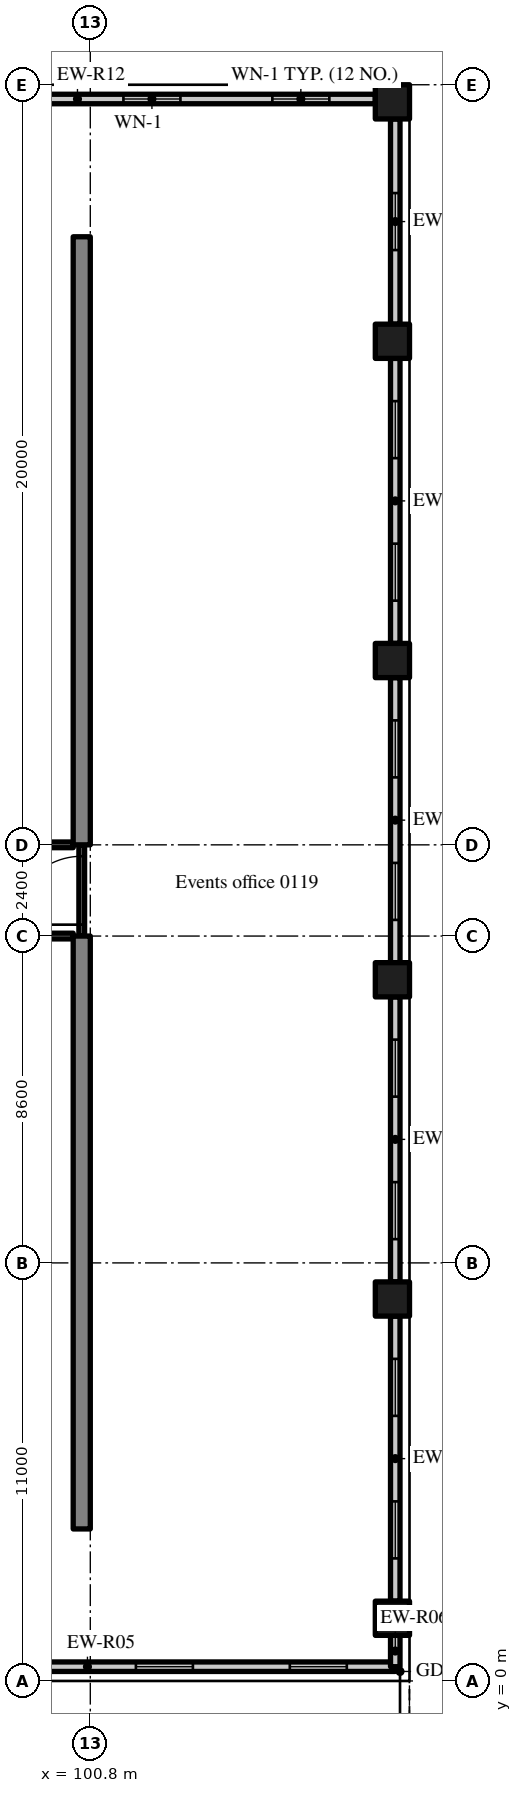
"""IFC4 building model, lengths in metres.
Left out: names, types, materials, properties, quantities, classifications, styles, units other than length and angle.
Written with IfcOpenShell. Run it as: python <this file> out.ifc"""

import sys

from ifc_helpers import new_model, si_unit, direction, frame, frame_2d, origin, origin_2d, place, context, subcontext, project, spatial, rectangle, extrude, source, transform, mapped, element, fill, save


model = new_model("IFC4")
c1 = context("Model", 3, precision=1e-05, world=origin(), true_north=direction((0.0, 1.0)))
c2 = subcontext(c1, "Body", "Model", "MODEL_VIEW")
j1 = project(units=[si_unit("LENGTHUNIT", "METRE"), si_unit("PLANEANGLEUNIT", "RADIAN")], contexts=[c1])
p1 = place(None, origin())
s1 = spatial("IfcSite", under=j1, at=p1, CompositionType="ELEMENT")
p2 = place(p1, origin())
s2 = spatial("IfcBuilding", under=s1, at=p2, CompositionType="ELEMENT")
p3 = place(p2, frame((0.0, 0.0, 6.0)))
s3 = spatial("IfcBuildingStorey", under=s2, at=p3, CompositionType="ELEMENT", Elevation=6.0)
m1 = source(origin(), c2, "Body", "SweptSolid", [
    extrude(rectangle(XDim=15.6, YDim=0.45, at=frame_2d((7.8, 0.0))), origin(), (0.0, 0.0, 1.0), 5.12),
])
p4 = place(p3, frame((100.575, 4.0, 0.0), z_axis=(0.0, 0.0, 1.0), x_axis=(0.0, 1.0, 0.0)))
e1 = element("IfcWall", 1, at=p4, inside=s3, PredefinedType="SHEAR", context=c2, shape_type="MappedRepresentation", body=[
    mapped(m1, transform((0.0, 0.0, 0.0), scale=1.0)),
])
m2 = source(origin(), c2, "Body", "SweptSolid", [
    extrude(rectangle(XDim=16.0, YDim=0.45, at=frame_2d((8.0, 0.0))), origin(), (0.0, 0.0, 1.0), 5.12),
])
p5 = place(p3, frame((100.575, 22.0, 0.0), z_axis=(0.0, 0.0, 1.0), x_axis=(0.0, 1.0, 0.0)))
e2 = element("IfcWall", 2, at=p5, inside=s3, PredefinedType="SHEAR", context=c2, shape_type="MappedRepresentation", body=[
    mapped(m2, transform((0.0, 0.0, 0.0), scale=1.0)),
])
m3 = source(origin(), c2, "Body", "SweptSolid", [
    extrude(rectangle(XDim=0.9, YDim=0.9, at=origin_2d()), origin(), (0.0, 0.0, 1.0), 5.12),
])
for number, where, z_axis, x_axis in (
    (3, (108.75, 1.65, 0.0), (0.0, 0.0, 1.0), (1.0, 0.0, 0.0)),
    (4, (108.75, 10.05, 0.0), (0.0, 0.0, 1.0), (1.0, 0.0, 0.0)),
    (5, (108.75, 18.45, 0.0), (0.0, 0.0, 1.0), (1.0, 0.0, 0.0)),
    (6, (108.75, 26.85, 0.0), (0.0, 0.0, 1.0), (1.0, 0.0, 0.0)),
    (7, (108.75, 35.25, 0.0), (0.0, 0.0, 1.0), (1.0, 0.0, 0.0)),
    (8, (108.75, 41.55, 0.0), (0.0, 0.0, 1.0), (1.0, 0.0, 0.0)),
):
    element("IfcColumn", number, at=place(p3, frame(where, z_axis=z_axis, x_axis=x_axis)), inside=s3, PredefinedType="COLUMN", context=c2, shape_type="MappedRepresentation", body=[
        mapped(m3, transform((0.0, 0.0, 0.0), scale=1.0)),
    ])
m4 = source(origin(), c2, "Body", "SweptSolid", [
    extrude(rectangle(XDim=16.2, YDim=0.25, at=frame_2d((8.1, 0.0))), origin(), (0.0, 0.0, 1.0), 4.37),
])
p6 = place(p3, frame((92.625, 0.375, 0.0), z_axis=(0.0, 0.0, 1.0), x_axis=(1.0, 0.0, 0.0)))
e9 = element("IfcWall", 9, at=p6, inside=s3, PredefinedType="SOLIDWALL", context=c2, shape_type="MappedRepresentation", body=[
    mapped(m4, transform((0.0, 0.0, 0.0), scale=1.0)),
])
m5 = source(origin(), c2, "Body", "SweptSolid", [
    extrude(rectangle(XDim=1.5, YDim=2.0, at=frame_2d((0.75, 1.0))), frame((0.0, 0.135, 0.0), z_axis=(0.0, -1.0, 0.0), x_axis=(1.0, 0.0, 0.0)), (0.0, 0.0, 1.0), 0.27),
])
p7 = place(p6, frame((1.275, 0.0, 0.9)))
e10 = element("IfcOpeningElement", 10, at=p7, cuts=e9, PredefinedType="OPENING", context=c2, shape_type="MappedRepresentation", body=[
    mapped(m5, transform((0.0, 0.0, 0.0), scale=1.0)),
])
p8 = place(p6, frame((5.325, 0.0, 0.9)))
e11 = element("IfcOpeningElement", 11, at=p8, cuts=e9, PredefinedType="OPENING", context=c2, shape_type="MappedRepresentation", body=[
    mapped(m5, transform((0.0, 0.0, 0.0), scale=1.0)),
])
p9 = place(p6, frame((9.375, 0.0, 0.9)))
e12 = element("IfcOpeningElement", 12, at=p9, cuts=e9, PredefinedType="OPENING", context=c2, shape_type="MappedRepresentation", body=[
    mapped(m5, transform((0.0, 0.0, 0.0), scale=1.0)),
])
p10 = place(p6, frame((13.425, 0.0, 0.9)))
e13 = element("IfcOpeningElement", 13, at=p10, cuts=e9, PredefinedType="OPENING", context=c2, shape_type="MappedRepresentation", body=[
    mapped(m5, transform((0.0, 0.0, 0.0), scale=1.0)),
])
m6 = source(origin(), c2, "Body", "SweptSolid", [
    extrude(rectangle(XDim=0.825, YDim=0.25, at=frame_2d((0.413, 0.0))), origin(), (0.0, 0.0, 1.0), 4.12),
])
p11 = place(p3, frame((108.825, 0.375, 0.0), z_axis=(0.0, 0.0, 1.0), x_axis=(0.0, 1.0, 0.0)))
e14 = element("IfcWall", 14, at=p11, inside=s3, PredefinedType="SOLIDWALL", context=c2, shape_type="MappedRepresentation", body=[
    mapped(m6, transform((0.0, 0.0, 0.0), scale=1.0)),
])
m7 = source(origin(), c2, "Body", "SweptSolid", [
    extrude(rectangle(XDim=7.5, YDim=0.25, at=frame_2d((3.75, 0.0))), origin(), (0.0, 0.0, 1.0), 4.12),
])
p12 = place(p3, frame((108.825, 2.1, 0.0), z_axis=(0.0, 0.0, 1.0), x_axis=(0.0, 1.0, 0.0)))
e15 = element("IfcWall", 15, at=p12, inside=s3, PredefinedType="SOLIDWALL", context=c2, shape_type="MappedRepresentation", body=[
    mapped(m7, transform((0.0, 0.0, 0.0), scale=1.0)),
])
p13 = place(p12, frame((1.125, 0.0, 0.9)))
e16 = element("IfcOpeningElement", 16, at=p13, cuts=e15, PredefinedType="OPENING", context=c2, shape_type="MappedRepresentation", body=[
    mapped(m5, transform((0.0, 0.0, 0.0), scale=1.0)),
])
p14 = place(p12, frame((4.875, 0.0, 0.9)))
e17 = element("IfcOpeningElement", 17, at=p14, cuts=e15, PredefinedType="OPENING", context=c2, shape_type="MappedRepresentation", body=[
    mapped(m5, transform((0.0, 0.0, 0.0), scale=1.0)),
])
p15 = place(p3, frame((108.825, 10.5, 0.0), z_axis=(0.0, 0.0, 1.0), x_axis=(0.0, 1.0, 0.0)))
e18 = element("IfcWall", 18, at=p15, inside=s3, PredefinedType="SOLIDWALL", context=c2, shape_type="MappedRepresentation", body=[
    mapped(m7, transform((0.0, 0.0, 0.0), scale=1.0)),
])
p16 = place(p15, frame((1.125, 0.0, 0.9)))
e19 = element("IfcOpeningElement", 19, at=p16, cuts=e18, PredefinedType="OPENING", context=c2, shape_type="MappedRepresentation", body=[
    mapped(m5, transform((0.0, 0.0, 0.0), scale=1.0)),
])
p17 = place(p15, frame((4.875, 0.0, 0.9)))
e20 = element("IfcOpeningElement", 20, at=p17, cuts=e18, PredefinedType="OPENING", context=c2, shape_type="MappedRepresentation", body=[
    mapped(m5, transform((0.0, 0.0, 0.0), scale=1.0)),
])
p18 = place(p3, frame((108.825, 18.9, 0.0), z_axis=(0.0, 0.0, 1.0), x_axis=(0.0, 1.0, 0.0)))
e21 = element("IfcWall", 21, at=p18, inside=s3, PredefinedType="SOLIDWALL", context=c2, shape_type="MappedRepresentation", body=[
    mapped(m7, transform((0.0, 0.0, 0.0), scale=1.0)),
])
p19 = place(p18, frame((1.125, 0.0, 0.9)))
e22 = element("IfcOpeningElement", 22, at=p19, cuts=e21, PredefinedType="OPENING", context=c2, shape_type="MappedRepresentation", body=[
    mapped(m5, transform((0.0, 0.0, 0.0), scale=1.0)),
])
p20 = place(p18, frame((4.875, 0.0, 0.9)))
e23 = element("IfcOpeningElement", 23, at=p20, cuts=e21, PredefinedType="OPENING", context=c2, shape_type="MappedRepresentation", body=[
    mapped(m5, transform((0.0, 0.0, 0.0), scale=1.0)),
])
p21 = place(p3, frame((108.825, 27.3, 0.0), z_axis=(0.0, 0.0, 1.0), x_axis=(0.0, 1.0, 0.0)))
e24 = element("IfcWall", 24, at=p21, inside=s3, PredefinedType="SOLIDWALL", context=c2, shape_type="MappedRepresentation", body=[
    mapped(m7, transform((0.0, 0.0, 0.0), scale=1.0)),
])
p22 = place(p21, frame((1.125, 0.0, 0.9)))
e25 = element("IfcOpeningElement", 25, at=p22, cuts=e24, PredefinedType="OPENING", context=c2, shape_type="MappedRepresentation", body=[
    mapped(m5, transform((0.0, 0.0, 0.0), scale=1.0)),
])
p23 = place(p21, frame((4.875, 0.0, 0.9)))
e26 = element("IfcOpeningElement", 26, at=p23, cuts=e24, PredefinedType="OPENING", context=c2, shape_type="MappedRepresentation", body=[
    mapped(m5, transform((0.0, 0.0, 0.0), scale=1.0)),
])
m8 = source(origin(), c2, "Body", "SweptSolid", [
    extrude(rectangle(XDim=5.4, YDim=0.25, at=frame_2d((2.7, 0.0))), origin(), (0.0, 0.0, 1.0), 4.12),
])
p24 = place(p3, frame((108.825, 35.7, 0.0), z_axis=(0.0, 0.0, 1.0), x_axis=(0.0, 1.0, 0.0)))
e27 = element("IfcWall", 27, at=p24, inside=s3, PredefinedType="SOLIDWALL", context=c2, shape_type="MappedRepresentation", body=[
    mapped(m8, transform((0.0, 0.0, 0.0), scale=1.0)),
])
p25 = place(p24, frame((1.95, 0.0, 0.9)))
e28 = element("IfcOpeningElement", 28, at=p25, cuts=e27, PredefinedType="OPENING", context=c2, shape_type="MappedRepresentation", body=[
    mapped(m5, transform((0.0, 0.0, 0.0), scale=1.0)),
])
m9 = source(origin(), c2, "Body", "SweptSolid", [
    extrude(rectangle(XDim=15.675, YDim=0.25, at=frame_2d((7.837, 0.0))), origin(), (0.0, 0.0, 1.0), 4.37),
])
p26 = place(p3, frame((108.3, 41.625, 0.0), z_axis=(0.0, 0.0, 1.0), x_axis=(-1.0, 0.0, 0.0)))
e29 = element("IfcWall", 29, at=p26, inside=s3, PredefinedType="SOLIDWALL", context=c2, shape_type="MappedRepresentation", body=[
    mapped(m9, transform((0.0, 0.0, 0.0), scale=1.0)),
])
m10 = source(origin(), c2, "Body", "SweptSolid", [
    extrude(rectangle(XDim=1.5, YDim=1.5, at=frame_2d((0.75, 0.75))), frame((0.0, 0.135, 0.0), z_axis=(0.0, -1.0, 0.0), x_axis=(1.0, 0.0, 0.0)), (0.0, 0.0, 1.0), 0.27),
])
p27 = place(p26, frame((1.209, 0.0, 0.9)))
e30 = element("IfcOpeningElement", 30, at=p27, cuts=e29, PredefinedType="OPENING", context=c2, shape_type="MappedRepresentation", body=[
    mapped(m10, transform((0.0, 0.0, 0.0), scale=1.0)),
])
p28 = place(p26, frame((5.128, 0.0, 0.9)))
e31 = element("IfcOpeningElement", 31, at=p28, cuts=e29, PredefinedType="OPENING", context=c2, shape_type="MappedRepresentation", body=[
    mapped(m10, transform((0.0, 0.0, 0.0), scale=1.0)),
])
p29 = place(p26, frame((9.047, 0.0, 0.9)))
e32 = element("IfcOpeningElement", 32, at=p29, cuts=e29, PredefinedType="OPENING", context=c2, shape_type="MappedRepresentation", body=[
    mapped(m10, transform((0.0, 0.0, 0.0), scale=1.0)),
])
p30 = place(p26, frame((12.966, 0.0, 0.9)))
e33 = element("IfcOpeningElement", 33, at=p30, cuts=e29, PredefinedType="OPENING", context=c2, shape_type="MappedRepresentation", body=[
    mapped(m10, transform((0.0, 0.0, 0.0), scale=1.0)),
])
m11 = source(origin(), c2, "Body", "SweptSolid", [
    extrude(rectangle(XDim=3.675, YDim=0.15, at=frame_2d((1.837, 0.0))), origin(), (0.0, 0.0, 1.0), 4.42),
])
p31 = place(p3, frame((96.675, 19.6, 0.0), z_axis=(0.0, 0.0, 1.0), x_axis=(1.0, 0.0, 0.0)))
e34 = element("IfcWall", 34, at=p31, inside=s3, PredefinedType="PARTITIONING", context=c2, shape_type="MappedRepresentation", body=[
    mapped(m11, transform((0.0, 0.0, 0.0), scale=1.0)),
])
m12 = source(origin(), c2, "Body", "SweptSolid", [
    extrude(rectangle(XDim=1.0, YDim=2.1, at=frame_2d((0.5, 1.05))), frame((0.0, 0.085, 0.0), z_axis=(0.0, -1.0, 0.0), x_axis=(1.0, 0.0, 0.0)), (0.0, 0.0, 1.0), 0.17),
])
p32 = place(p31, frame((1.337, 0.0, 0.0)))
e35 = element("IfcOpeningElement", 35, at=p32, cuts=e34, PredefinedType="OPENING", context=c2, shape_type="MappedRepresentation", body=[
    mapped(m12, transform((0.0, 0.0, 0.0), scale=1.0)),
])
m13 = source(origin(), c2, "Body", "SweptSolid", [
    extrude(rectangle(XDim=2.4, YDim=0.15, at=frame_2d((1.2, 0.0))), origin(), (0.0, 0.0, 1.0), 4.22),
])
p33 = place(p3, frame((100.575, 19.6, 0.0), z_axis=(0.0, 0.0, 1.0), x_axis=(0.0, 1.0, 0.0)))
e36 = element("IfcWall", 36, at=p33, inside=s3, PredefinedType="PARTITIONING", context=c2, shape_type="MappedRepresentation", body=[
    mapped(m13, transform((0.0, 0.0, 0.0), scale=1.0)),
])
m14 = source(origin(), c2, "Body", "SweptSolid", [
    extrude(rectangle(XDim=1.8, YDim=2.1, at=frame_2d((0.9, 1.05))), frame((0.0, 0.085, 0.0), z_axis=(0.0, -1.0, 0.0), x_axis=(1.0, 0.0, 0.0)), (0.0, 0.0, 1.0), 0.17),
])
p34 = place(p33, frame((0.3, 0.0, 0.0)))
e37 = element("IfcOpeningElement", 37, at=p34, cuts=e36, PredefinedType="OPENING", context=c2, shape_type="MappedRepresentation", body=[
    mapped(m14, transform((0.0, 0.0, 0.0), scale=1.0)),
])
m15 = source(origin(), c2, "Body", "SweptSolid", [
    extrude(rectangle(XDim=7.725, YDim=0.15, at=frame_2d((3.863, 0.0))), origin(), (0.0, 0.0, 1.0), 4.42),
])
p35 = place(p3, frame((92.625, 22.0, 0.0), z_axis=(0.0, 0.0, 1.0), x_axis=(1.0, 0.0, 0.0)))
e38 = element("IfcWall", 38, at=p35, inside=s3, PredefinedType="PARTITIONING", context=c2, shape_type="MappedRepresentation", body=[
    mapped(m15, transform((0.0, 0.0, 0.0), scale=1.0)),
])
p36 = place(p35, frame((2.962, 0.0, 0.0)))
e39 = element("IfcOpeningElement", 39, at=p36, cuts=e38, PredefinedType="OPENING", context=c2, shape_type="MappedRepresentation", body=[
    mapped(m14, transform((0.0, 0.0, 0.0), scale=1.0)),
])
m16 = source(origin(), c2, "Body", "SweptSolid", [
    extrude(rectangle(XDim=1.5, YDim=2.0, at=frame_2d((0.75, 1.0))), frame((0.0, 0.03, 0.0), z_axis=(0.0, -1.0, 0.0), x_axis=(1.0, 0.0, 0.0)), (0.0, 0.0, 1.0), 0.06),
])
p37 = place(p9, origin())
e40 = element("IfcWindow", 40, at=p37, inside=s3, PartitioningType="SINGLE_PANEL", PredefinedType="WINDOW", context=c2, shape_type="MappedRepresentation", body=[
    mapped(m16, transform((0.0, 0.0, 0.0), scale=1.0)),
])
fill(e12, e40)
p38 = place(p10, origin())
e41 = element("IfcWindow", 41, at=p38, inside=s3, PartitioningType="SINGLE_PANEL", PredefinedType="WINDOW", context=c2, shape_type="MappedRepresentation", body=[
    mapped(m16, transform((0.0, 0.0, 0.0), scale=1.0)),
])
fill(e13, e41)
p39 = place(p13, origin())
e42 = element("IfcWindow", 42, at=p39, inside=s3, PartitioningType="SINGLE_PANEL", PredefinedType="WINDOW", context=c2, shape_type="MappedRepresentation", body=[
    mapped(m16, transform((0.0, 0.0, 0.0), scale=1.0)),
])
fill(e16, e42)
p40 = place(p14, origin())
e43 = element("IfcWindow", 43, at=p40, inside=s3, PartitioningType="SINGLE_PANEL", PredefinedType="WINDOW", context=c2, shape_type="MappedRepresentation", body=[
    mapped(m16, transform((0.0, 0.0, 0.0), scale=1.0)),
])
fill(e17, e43)
p41 = place(p16, origin())
e44 = element("IfcWindow", 44, at=p41, inside=s3, PartitioningType="SINGLE_PANEL", PredefinedType="WINDOW", context=c2, shape_type="MappedRepresentation", body=[
    mapped(m16, transform((0.0, 0.0, 0.0), scale=1.0)),
])
fill(e19, e44)
p42 = place(p17, origin())
e45 = element("IfcWindow", 45, at=p42, inside=s3, PartitioningType="SINGLE_PANEL", PredefinedType="WINDOW", context=c2, shape_type="MappedRepresentation", body=[
    mapped(m16, transform((0.0, 0.0, 0.0), scale=1.0)),
])
fill(e20, e45)
p43 = place(p19, origin())
e46 = element("IfcWindow", 46, at=p43, inside=s3, PartitioningType="SINGLE_PANEL", PredefinedType="WINDOW", context=c2, shape_type="MappedRepresentation", body=[
    mapped(m16, transform((0.0, 0.0, 0.0), scale=1.0)),
])
fill(e22, e46)
p44 = place(p20, origin())
e47 = element("IfcWindow", 47, at=p44, inside=s3, PartitioningType="SINGLE_PANEL", PredefinedType="WINDOW", context=c2, shape_type="MappedRepresentation", body=[
    mapped(m16, transform((0.0, 0.0, 0.0), scale=1.0)),
])
fill(e23, e47)
p45 = place(p22, origin())
e48 = element("IfcWindow", 48, at=p45, inside=s3, PartitioningType="SINGLE_PANEL", PredefinedType="WINDOW", context=c2, shape_type="MappedRepresentation", body=[
    mapped(m16, transform((0.0, 0.0, 0.0), scale=1.0)),
])
fill(e25, e48)
p46 = place(p23, origin())
e49 = element("IfcWindow", 49, at=p46, inside=s3, PartitioningType="SINGLE_PANEL", PredefinedType="WINDOW", context=c2, shape_type="MappedRepresentation", body=[
    mapped(m16, transform((0.0, 0.0, 0.0), scale=1.0)),
])
fill(e26, e49)
p47 = place(p25, origin())
e50 = element("IfcWindow", 50, at=p47, inside=s3, PartitioningType="SINGLE_PANEL", PredefinedType="WINDOW", context=c2, shape_type="MappedRepresentation", body=[
    mapped(m16, transform((0.0, 0.0, 0.0), scale=1.0)),
])
fill(e28, e50)
m17 = source(origin(), c2, "Body", "SweptSolid", [
    extrude(rectangle(XDim=1.5, YDim=1.5, at=frame_2d((0.75, 0.75))), frame((0.0, 0.03, 0.0), z_axis=(0.0, -1.0, 0.0), x_axis=(1.0, 0.0, 0.0)), (0.0, 0.0, 1.0), 0.06),
])
p48 = place(p27, origin())
e51 = element("IfcWindow", 51, at=p48, inside=s3, PartitioningType="SINGLE_PANEL", PredefinedType="WINDOW", context=c2, shape_type="MappedRepresentation", body=[
    mapped(m17, transform((0.0, 0.0, 0.0), scale=1.0)),
])
fill(e30, e51)
p49 = place(p28, origin())
e52 = element("IfcWindow", 52, at=p49, inside=s3, PartitioningType="SINGLE_PANEL", PredefinedType="WINDOW", context=c2, shape_type="MappedRepresentation", body=[
    mapped(m17, transform((0.0, 0.0, 0.0), scale=1.0)),
])
fill(e31, e52)
m18 = source(origin(), c2, "Body", "SweptSolid", [
    extrude(rectangle(XDim=1.8, YDim=2.1, at=frame_2d((0.9, 1.05))), frame((0.0, 0.025, 0.0), z_axis=(0.0, -1.0, 0.0), x_axis=(1.0, 0.0, 0.0)), (0.0, 0.0, 1.0), 0.05),
])
p50 = place(p34, origin())
e53 = element("IfcDoor", 53, at=p50, inside=s3, OperationType="DOUBLE_DOOR_SINGLE_SWING", PredefinedType="DOOR", context=c2, shape_type="MappedRepresentation", body=[
    mapped(m18, transform((0.0, 0.0, 0.0), scale=1.0)),
])
fill(e37, e53)
save(model, sys.argv[1])
